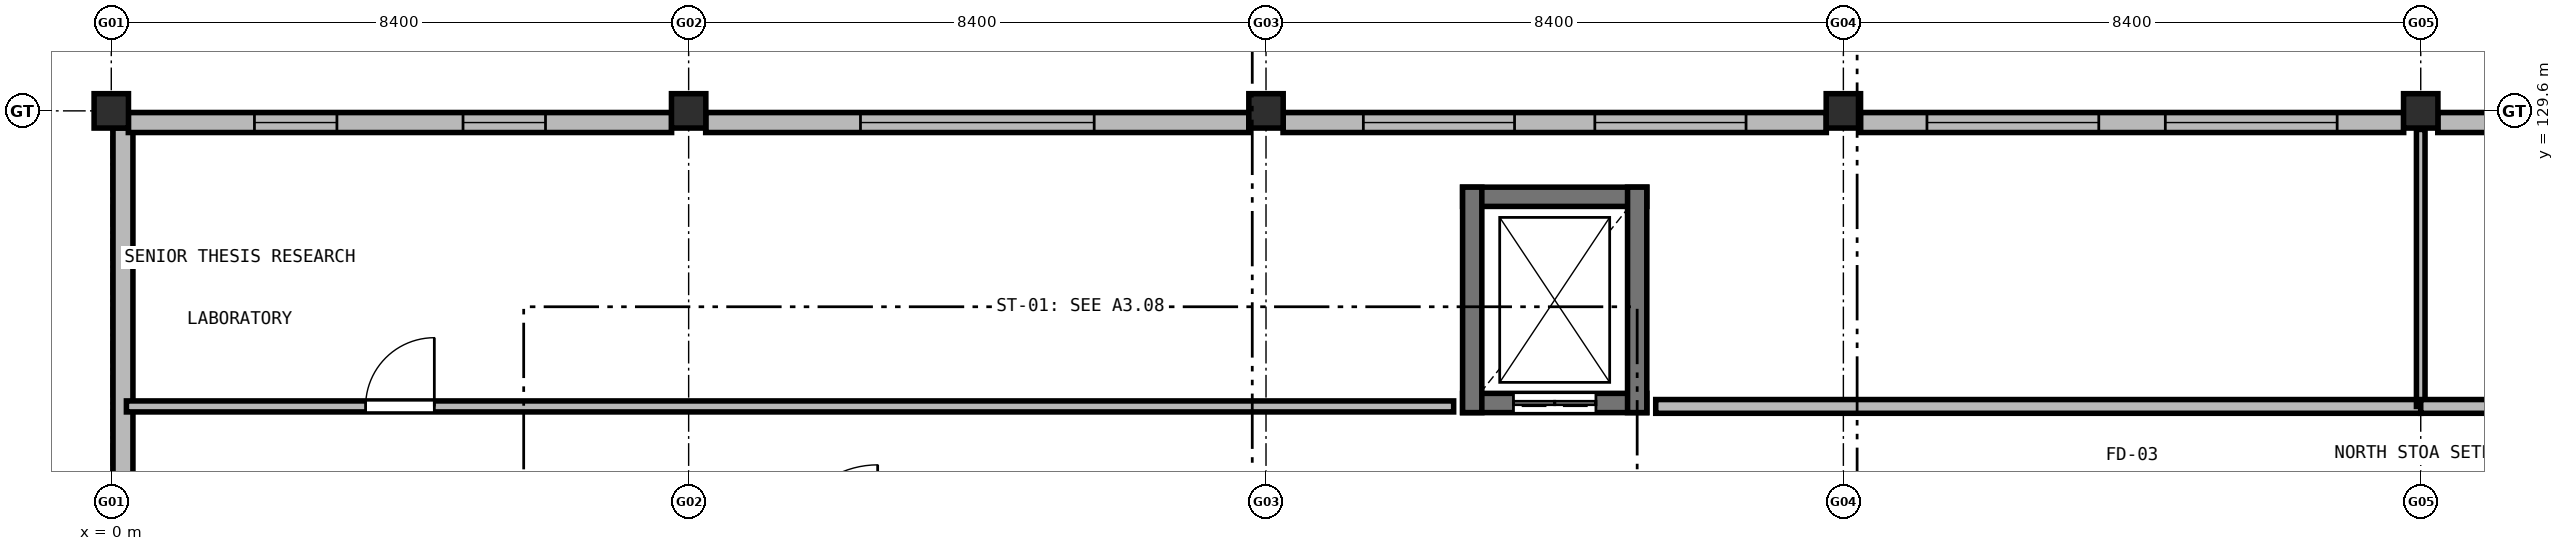
"""IFC4 building model, lengths in metres.
Left out: names, types, materials, properties, quantities, classifications, styles, units other than length and angle.
Written with IfcOpenShell. Run it as: python <this file> out.ifc"""

import sys

from ifc_helpers import new_model, si_unit, direction, frame, frame_2d, origin, origin_2d, place, context, subcontext, project, spatial, rectangle, extrude, element, fill, save


model = new_model("IFC4")
c1 = context("Model", 3, precision=1e-05, world=origin(), true_north=direction((0.0, 1.0)))
c2 = subcontext(c1, "Body", "Model", "MODEL_VIEW")
j1 = project(units=[si_unit("LENGTHUNIT", "METRE"), si_unit("PLANEANGLEUNIT", "RADIAN")], contexts=[c1])
p1 = place(None, origin())
s1 = spatial("IfcSite", under=j1, at=p1, CompositionType="ELEMENT")
p2 = place(p1, origin())
s2 = spatial("IfcBuilding", under=s1, at=p2, CompositionType="ELEMENT")
p3 = place(p2, frame((0.0, 0.0, 21.9)))
s3 = spatial("IfcBuildingStorey", under=s2, at=p3, CompositionType="ELEMENT", Elevation=21.9)
for number, where, z_axis, x_axis in (
    (1, (0.0, 129.6, 0.0), (0.0, 0.0, 1.0), (1.0, 0.0, 0.0)),
    (2, (8.4, 129.6, 0.0), (0.0, 0.0, 1.0), (1.0, 0.0, 0.0)),
    (3, (16.8, 129.6, 0.0), (0.0, 0.0, 1.0), (1.0, 0.0, 0.0)),
    (4, (25.2, 129.6, 0.0), (0.0, 0.0, 1.0), (1.0, 0.0, 0.0)),
    (5, (33.6, 129.6, 0.0), (0.0, 0.0, 1.0), (1.0, 0.0, 0.0)),
):
    element("IfcColumn", number, at=place(p3, frame(where, z_axis=z_axis, x_axis=x_axis)), inside=s3, PredefinedType="COLUMN", context=c2, shape_type="SweptSolid", body=[
        extrude(rectangle(XDim=0.5, YDim=0.5, at=origin_2d()), origin(), (0.0, 0.0, 1.0), 4.2),
    ])
p4 = place(p3, frame((0.17, 122.648, 0.0), z_axis=(0.0, 0.0, 1.0), x_axis=(0.0, 1.0, 0.0)))
e6 = element("IfcWall", 6, at=p4, inside=s3, PredefinedType="SOLIDWALL", context=c2, shape_type="SweptSolid", body=[
    extrude(rectangle(XDim=6.704, YDim=0.29, at=frame_2d((3.352, 0.0))), origin(), (0.0, 0.0, 1.0), 3.46),
])
p5 = place(p3, frame((0.248, 129.43, 0.0), z_axis=(0.0, 0.0, 1.0), x_axis=(1.0, 0.0, 0.0)))
e7 = element("IfcWall", 7, at=p5, inside=s3, PredefinedType="SOLIDWALL", context=c2, shape_type="SweptSolid", body=[
    extrude(rectangle(XDim=7.904, YDim=0.29, at=frame_2d((3.952, 0.0))), origin(), (0.0, 0.0, 1.0), 3.25),
])
p6 = place(p5, frame((1.835, 0.0, 0.95)))
e8 = element("IfcOpeningElement", 8, at=p6, cuts=e7, PredefinedType="OPENING", context=c2, shape_type="SweptSolid", body=[
    extrude(rectangle(XDim=1.2, YDim=1.4, at=frame_2d((0.6, 0.7))), frame((0.0, 0.155, 0.0), z_axis=(0.0, -1.0, 0.0), x_axis=(1.0, 0.0, 0.0)), (0.0, 0.0, 1.0), 0.31),
])
p7 = place(p5, frame((4.869, 0.0, 0.95)))
e9 = element("IfcOpeningElement", 9, at=p7, cuts=e7, PredefinedType="OPENING", context=c2, shape_type="SweptSolid", body=[
    extrude(rectangle(XDim=1.2, YDim=1.4, at=frame_2d((0.6, 0.7))), frame((0.0, 0.155, 0.0), z_axis=(0.0, -1.0, 0.0), x_axis=(1.0, 0.0, 0.0)), (0.0, 0.0, 1.0), 0.31),
])
p8 = place(p3, frame((8.648, 129.43, 0.0), z_axis=(0.0, 0.0, 1.0), x_axis=(1.0, 0.0, 0.0)))
e10 = element("IfcWall", 10, at=p8, inside=s3, PredefinedType="SOLIDWALL", context=c2, shape_type="SweptSolid", body=[
    extrude(rectangle(XDim=7.904, YDim=0.29, at=frame_2d((3.952, 0.0))), origin(), (0.0, 0.0, 1.0), 3.25),
])
p9 = place(p8, frame((2.252, 0.0, 0.95)))
e11 = element("IfcOpeningElement", 11, at=p9, cuts=e10, PredefinedType="OPENING", context=c2, shape_type="SweptSolid", body=[
    extrude(rectangle(XDim=3.4, YDim=1.8, at=frame_2d((1.7, 0.9))), frame((0.0, 0.155, 0.0), z_axis=(0.0, -1.0, 0.0), x_axis=(1.0, 0.0, 0.0)), (0.0, 0.0, 1.0), 0.31),
])
p10 = place(p3, frame((17.048, 129.43, 0.0), z_axis=(0.0, 0.0, 1.0), x_axis=(1.0, 0.0, 0.0)))
e12 = element("IfcWall", 12, at=p10, inside=s3, PredefinedType="SOLIDWALL", context=c2, shape_type="SweptSolid", body=[
    extrude(rectangle(XDim=7.904, YDim=0.29, at=frame_2d((3.952, 0.0))), origin(), (0.0, 0.0, 1.0), 3.25),
])
p11 = place(p10, frame((1.168, 0.0, 0.95)))
e13 = element("IfcOpeningElement", 13, at=p11, cuts=e12, PredefinedType="OPENING", context=c2, shape_type="SweptSolid", body=[
    extrude(rectangle(XDim=2.2, YDim=1.7, at=frame_2d((1.1, 0.85))), frame((0.0, 0.155, 0.0), z_axis=(0.0, -1.0, 0.0), x_axis=(1.0, 0.0, 0.0)), (0.0, 0.0, 1.0), 0.31),
])
p12 = place(p10, frame((4.536, 0.0, 0.95)))
e14 = element("IfcOpeningElement", 14, at=p12, cuts=e12, PredefinedType="OPENING", context=c2, shape_type="SweptSolid", body=[
    extrude(rectangle(XDim=2.2, YDim=1.7, at=frame_2d((1.1, 0.85))), frame((0.0, 0.155, 0.0), z_axis=(0.0, -1.0, 0.0), x_axis=(1.0, 0.0, 0.0)), (0.0, 0.0, 1.0), 0.31),
])
p13 = place(p3, frame((25.448, 129.43, 0.0), z_axis=(0.0, 0.0, 1.0), x_axis=(1.0, 0.0, 0.0)))
e15 = element("IfcWall", 15, at=p13, inside=s3, PredefinedType="SOLIDWALL", context=c2, shape_type="SweptSolid", body=[
    extrude(rectangle(XDim=7.904, YDim=0.29, at=frame_2d((3.952, 0.0))), origin(), (0.0, 0.0, 1.0), 3.25),
])
p14 = place(p13, frame((0.968, 0.0, 0.95)))
e16 = element("IfcOpeningElement", 16, at=p14, cuts=e15, PredefinedType="OPENING", context=c2, shape_type="SweptSolid", body=[
    extrude(rectangle(XDim=2.5, YDim=2.05, at=frame_2d((1.25, 1.025))), frame((0.0, 0.155, 0.0), z_axis=(0.0, -1.0, 0.0), x_axis=(1.0, 0.0, 0.0)), (0.0, 0.0, 1.0), 0.31),
])
p15 = place(p13, frame((4.436, 0.0, 0.95)))
e17 = element("IfcOpeningElement", 17, at=p15, cuts=e15, PredefinedType="OPENING", context=c2, shape_type="SweptSolid", body=[
    extrude(rectangle(XDim=2.5, YDim=2.05, at=frame_2d((1.25, 1.025))), frame((0.0, 0.155, 0.0), z_axis=(0.0, -1.0, 0.0), x_axis=(1.0, 0.0, 0.0)), (0.0, 0.0, 1.0), 0.31),
])
p16 = place(p3, frame((33.848, 129.43, 0.0), z_axis=(0.0, 0.0, 1.0), x_axis=(1.0, 0.0, 0.0)))
e18 = element("IfcWall", 18, at=p16, inside=s3, PredefinedType="SOLIDWALL", context=c2, shape_type="SweptSolid", body=[
    extrude(rectangle(XDim=7.904, YDim=0.29, at=frame_2d((3.952, 0.0))), origin(), (0.0, 0.0, 1.0), 3.25),
])
p17 = place(p16, frame((1.235, 0.0, 0.95)))
e19 = element("IfcOpeningElement", 19, at=p17, cuts=e18, PredefinedType="OPENING", context=c2, shape_type="SweptSolid", body=[
    extrude(rectangle(XDim=2.1, YDim=1.85, at=frame_2d((1.05, 0.925))), frame((0.0, 0.155, 0.0), z_axis=(0.0, -1.0, 0.0), x_axis=(1.0, 0.0, 0.0)), (0.0, 0.0, 1.0), 0.31),
])
p18 = place(p16, frame((4.569, 0.0, 0.95)))
e20 = element("IfcOpeningElement", 20, at=p18, cuts=e18, PredefinedType="OPENING", context=c2, shape_type="SweptSolid", body=[
    extrude(rectangle(XDim=2.1, YDim=1.85, at=frame_2d((1.05, 0.925))), frame((0.0, 0.155, 0.0), z_axis=(0.0, -1.0, 0.0), x_axis=(1.0, 0.0, 0.0)), (0.0, 0.0, 1.0), 0.31),
])
p19 = place(p3, frame((22.34, 125.35, 0.0), z_axis=(0.0, 0.0, 1.0), x_axis=(-1.0, 0.0, 0.0)))
e21 = element("IfcWall", 21, at=p19, inside=s3, PredefinedType="SHEAR", context=c2, shape_type="SweptSolid", body=[
    extrude(rectangle(XDim=2.68, YDim=0.28, at=frame_2d((1.34, 0.0))), origin(), (0.0, 0.0, 1.0), 3.88),
])
p20 = place(p19, frame((0.74, 0.0, 0.0)))
e22 = element("IfcOpeningElement", 22, at=p20, cuts=e21, PredefinedType="OPENING", context=c2, shape_type="SweptSolid", body=[
    extrude(rectangle(XDim=1.2, YDim=2.15, at=frame_2d((0.6, 1.075))), frame((0.0, 0.15, 0.0), z_axis=(0.0, -1.0, 0.0), x_axis=(1.0, 0.0, 0.0)), (0.0, 0.0, 1.0), 0.3),
])
p21 = place(p3, frame((19.66, 128.35, 0.0), z_axis=(0.0, 0.0, 1.0), x_axis=(1.0, 0.0, 0.0)))
e23 = element("IfcWall", 23, at=p21, inside=s3, PredefinedType="SHEAR", context=c2, shape_type="SweptSolid", body=[
    extrude(rectangle(XDim=2.68, YDim=0.28, at=frame_2d((1.34, 0.0))), origin(), (0.0, 0.0, 1.0), 3.88),
])
for number, where, z_axis, x_axis in (
    (24, (19.8, 125.21, 0.0), (0.0, 0.0, 1.0), (0.0, 1.0, 0.0)),
    (25, (22.2, 128.49, 0.0), (0.0, 0.0, 1.0), (0.0, -1.0, 0.0)),
):
    element("IfcWall", number, at=place(p3, frame(where, z_axis=z_axis, x_axis=x_axis)), inside=s3, PredefinedType="SHEAR", context=c2, shape_type="SweptSolid", body=[
        extrude(rectangle(XDim=3.28, YDim=0.28, at=frame_2d((1.64, 0.0))), origin(), (0.0, 0.0, 1.0), 3.88),
    ])
p22 = place(p3, frame((0.22, 125.3, 0.0), z_axis=(0.0, 0.0, 1.0), x_axis=(1.0, 0.0, 0.0)))
e26 = element("IfcWall", 26, at=p22, inside=s3, PredefinedType="PARTITIONING", context=c2, shape_type="SweptSolid", body=[
    extrude(rectangle(XDim=19.31, YDim=0.16, at=frame_2d((9.655, 0.0))), origin(), (0.0, 0.0, 1.0), 3.455),
])
p23 = place(p22, frame((3.48, 0.0, 0.0)))
e27 = element("IfcOpeningElement", 27, at=p23, cuts=e26, PredefinedType="OPENING", context=c2, shape_type="SweptSolid", body=[
    extrude(rectangle(XDim=1.0, YDim=2.1, at=frame_2d((0.5, 1.05))), frame((0.0, 0.09, 0.0), z_axis=(0.0, -1.0, 0.0), x_axis=(1.0, 0.0, 0.0)), (0.0, 0.0, 1.0), 0.18),
])
p24 = place(p3, frame((22.47, 125.3, 0.0), z_axis=(0.0, 0.0, 1.0), x_axis=(1.0, 0.0, 0.0)))
e28 = element("IfcWall", 28, at=p24, inside=s3, PredefinedType="SOLIDWALL", context=c2, shape_type="SweptSolid", body=[
    extrude(rectangle(XDim=11.13, YDim=0.2, at=frame_2d((5.565, 0.0))), origin(), (0.0, 0.0, 1.0), 3.455),
])
p25 = place(p3, frame((33.6, 125.3, 0.0), z_axis=(0.0, 0.0, 1.0), x_axis=(0.0, 1.0, 0.0)))
e29 = element("IfcWall", 29, at=p25, inside=s3, PredefinedType="PARTITIONING", context=c2, shape_type="SweptSolid", body=[
    extrude(rectangle(XDim=4.03, YDim=0.125, at=frame_2d((2.015, 0.0))), origin(), (0.0, 0.0, 1.0), 3.245),
])
p26 = place(p3, frame((33.6, 125.3, 0.0), z_axis=(0.0, 0.0, 1.0), x_axis=(1.0, 0.0, 0.0)))
e30 = element("IfcWall", 30, at=p26, inside=s3, PredefinedType="SOLIDWALL", context=c2, shape_type="SweptSolid", body=[
    extrude(rectangle(XDim=19.53, YDim=0.2, at=frame_2d((9.765, 0.0))), origin(), (0.0, 0.0, 1.0), 3.455),
])
p27 = place(p26, frame((3.475, 0.0, 0.0)))
e31 = element("IfcOpeningElement", 31, at=p27, cuts=e30, PredefinedType="OPENING", context=c2, shape_type="SweptSolid", body=[
    extrude(rectangle(XDim=1.45, YDim=2.2, at=frame_2d((0.725, 1.1))), frame((0.0, 0.11, 0.0), z_axis=(0.0, -1.0, 0.0), x_axis=(1.0, 0.0, 0.0)), (0.0, 0.0, 1.0), 0.22),
])
p28 = place(p6, origin())
e32 = element("IfcWindow", 32, at=p28, inside=s3, PartitioningType="SINGLE_PANEL", PredefinedType="WINDOW", context=c2, shape_type="SweptSolid", body=[
    extrude(rectangle(XDim=1.2, YDim=1.4, at=frame_2d((0.6, 0.7))), frame((0.0, 0.03, 0.0), z_axis=(0.0, -1.0, 0.0), x_axis=(1.0, 0.0, 0.0)), (0.0, 0.0, 1.0), 0.06),
])
fill(e8, e32)
p29 = place(p7, origin())
e33 = element("IfcWindow", 33, at=p29, inside=s3, PartitioningType="SINGLE_PANEL", PredefinedType="WINDOW", context=c2, shape_type="SweptSolid", body=[
    extrude(rectangle(XDim=1.2, YDim=1.4, at=frame_2d((0.6, 0.7))), frame((0.0, 0.03, 0.0), z_axis=(0.0, -1.0, 0.0), x_axis=(1.0, 0.0, 0.0)), (0.0, 0.0, 1.0), 0.06),
])
fill(e9, e33)
p30 = place(p9, origin())
e34 = element("IfcWindow", 34, at=p30, inside=s3, PartitioningType="SINGLE_PANEL", PredefinedType="WINDOW", context=c2, shape_type="SweptSolid", body=[
    extrude(rectangle(XDim=3.4, YDim=1.8, at=frame_2d((1.7, 0.9))), frame((0.0, 0.03, 0.0), z_axis=(0.0, -1.0, 0.0), x_axis=(1.0, 0.0, 0.0)), (0.0, 0.0, 1.0), 0.06),
])
fill(e11, e34)
p31 = place(p11, origin())
e35 = element("IfcWindow", 35, at=p31, inside=s3, PartitioningType="SINGLE_PANEL", PredefinedType="WINDOW", context=c2, shape_type="SweptSolid", body=[
    extrude(rectangle(XDim=2.2, YDim=1.7, at=frame_2d((1.1, 0.85))), frame((0.0, 0.03, 0.0), z_axis=(0.0, -1.0, 0.0), x_axis=(1.0, 0.0, 0.0)), (0.0, 0.0, 1.0), 0.06),
])
fill(e13, e35)
p32 = place(p12, origin())
e36 = element("IfcWindow", 36, at=p32, inside=s3, PartitioningType="SINGLE_PANEL", PredefinedType="WINDOW", context=c2, shape_type="SweptSolid", body=[
    extrude(rectangle(XDim=2.2, YDim=1.7, at=frame_2d((1.1, 0.85))), frame((0.0, 0.03, 0.0), z_axis=(0.0, -1.0, 0.0), x_axis=(1.0, 0.0, 0.0)), (0.0, 0.0, 1.0), 0.06),
])
fill(e14, e36)
p33 = place(p14, origin())
e37 = element("IfcWindow", 37, at=p33, inside=s3, PartitioningType="SINGLE_PANEL", PredefinedType="WINDOW", context=c2, shape_type="SweptSolid", body=[
    extrude(rectangle(XDim=2.5, YDim=2.05, at=frame_2d((1.25, 1.025))), frame((0.0, 0.03, 0.0), z_axis=(0.0, -1.0, 0.0), x_axis=(1.0, 0.0, 0.0)), (0.0, 0.0, 1.0), 0.06),
])
fill(e16, e37)
p34 = place(p15, origin())
e38 = element("IfcWindow", 38, at=p34, inside=s3, PartitioningType="SINGLE_PANEL", PredefinedType="WINDOW", context=c2, shape_type="SweptSolid", body=[
    extrude(rectangle(XDim=2.5, YDim=2.05, at=frame_2d((1.25, 1.025))), frame((0.0, 0.03, 0.0), z_axis=(0.0, -1.0, 0.0), x_axis=(1.0, 0.0, 0.0)), (0.0, 0.0, 1.0), 0.06),
])
fill(e17, e38)
p35 = place(p20, origin())
e39 = element("IfcDoor", 39, at=p35, inside=s3, OperationType="DOUBLE_DOOR_SLIDING", PredefinedType="DOOR", context=c2, shape_type="SweptSolid", body=[
    extrude(rectangle(XDim=1.2, YDim=2.15, at=frame_2d((0.6, 1.075))), frame((0.0, 0.025, 0.0), z_axis=(0.0, -1.0, 0.0), x_axis=(1.0, 0.0, 0.0)), (0.0, 0.0, 1.0), 0.05),
])
fill(e22, e39)
p36 = place(p23, origin())
e40 = element("IfcDoor", 40, at=p36, inside=s3, OperationType="SINGLE_SWING_RIGHT", PredefinedType="DOOR", context=c2, shape_type="SweptSolid", body=[
    extrude(rectangle(XDim=1.0, YDim=2.1, at=frame_2d((0.5, 1.05))), frame((0.0, 0.025, 0.0), z_axis=(0.0, -1.0, 0.0), x_axis=(1.0, 0.0, 0.0)), (0.0, 0.0, 1.0), 0.05),
])
fill(e27, e40)
save(model, sys.argv[1])
